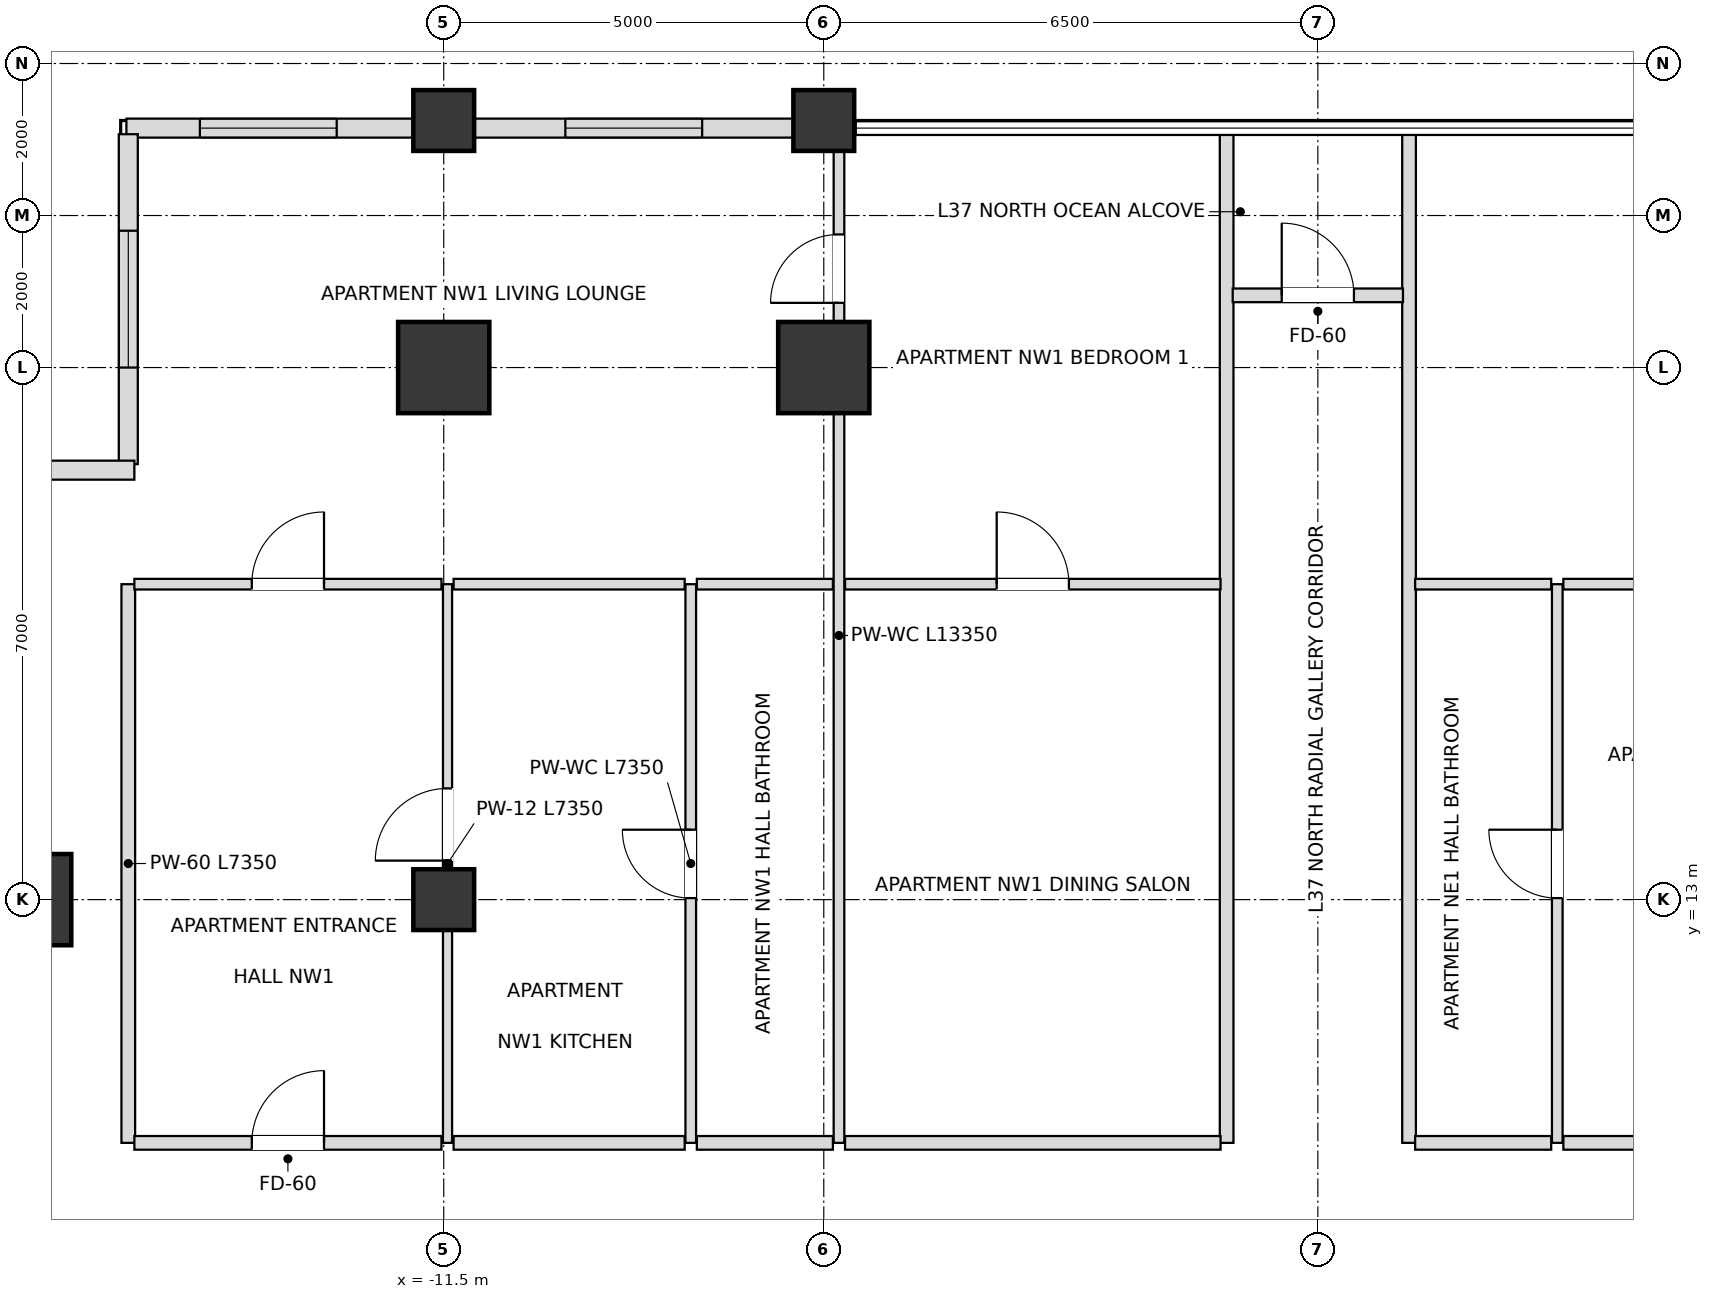
"""IFC4 building model, lengths in metres.
Left out: names, types, materials, properties, quantities, classifications, styles, units other than length and angle.
Written with IfcOpenShell. Run it as: python <this file> out.ifc"""

import sys

from ifc_helpers import new_model, si_unit, direction, frame, frame_2d, origin, origin_2d, place, context, subcontext, project, spatial, rectangle, extrude, element, fill, save


model = new_model("IFC4")
c1 = context("Model", 3, precision=1e-05, world=origin(), true_north=direction((0.0, 1.0)))
c2 = subcontext(c1, "Body", "Model", "MODEL_VIEW")
j1 = project(units=[si_unit("LENGTHUNIT", "METRE"), si_unit("PLANEANGLEUNIT", "RADIAN")], contexts=[c1])
p1 = place(None, origin())
s1 = spatial("IfcSite", under=j1, at=p1, CompositionType="ELEMENT")
p2 = place(p1, origin())
s2 = spatial("IfcBuilding", under=s1, at=p2, CompositionType="ELEMENT")
p3 = place(p2, frame((0.0, 0.0, 147.6)))
s3 = spatial("IfcBuildingStorey", under=s2, at=p3, CompositionType="ELEMENT", Elevation=147.6)
for number, where, z_axis, x_axis in (
    (1, (-6.5, 20.0, 0.0), (0.0, 0.0, 1.0), (1.0, 0.0, 0.0)),
    (2, (-11.5, 20.0, 0.0), (0.0, 0.0, 1.0), (1.0, 0.0, 0.0)),
    (3, (-17.0, 13.0, 0.0), (0.0, 0.0, 1.0), (1.0, 0.0, 0.0)),
):
    element("IfcColumn", number, at=place(p3, frame(where, z_axis=z_axis, x_axis=x_axis)), inside=s3, PredefinedType="USERDEFINED", context=c2, shape_type="SweptSolid", body=[
        extrude(rectangle(XDim=1.2, YDim=1.2, at=origin_2d()), origin(), (0.0, 0.0, 1.0), 3.6),
    ])
for number, where, z_axis, x_axis in (
    (4, (-11.5, 13.0, 0.0), (0.0, 0.0, 1.0), (1.0, 0.0, 0.0)),
    (5, (-11.5, 23.25, 0.0), (0.0, 0.0, 1.0), (1.0, 0.0, 0.0)),
    (6, (-6.5, 23.25, 0.0), (0.0, 0.0, 1.0), (1.0, 0.0, 0.0)),
):
    element("IfcColumn", number, at=place(p3, frame(where, z_axis=z_axis, x_axis=x_axis)), inside=s3, PredefinedType="COLUMN", context=c2, shape_type="SweptSolid", body=[
        extrude(rectangle(XDim=0.8, YDim=0.8, at=origin_2d()), origin(), (0.0, 0.0, 1.0), 3.6),
    ])
p4 = place(p3, frame((-6.895, 23.15, 0.0), z_axis=(0.0, 0.0, 1.0), x_axis=(-1.0, 0.0, 0.0)))
e7 = element("IfcWall", 7, at=p4, inside=s3, PredefinedType="SOLIDWALL", context=c2, shape_type="SweptSolid", body=[
    extrude(rectangle(XDim=4.21, YDim=0.25, at=frame_2d((2.105, 0.0))), origin(), (0.0, 0.0, 1.0), 2.736),
])
p5 = place(p4, frame((1.205, 0.0, 0.72)))
e8 = element("IfcOpeningElement", 8, at=p5, cuts=e7, PredefinedType="OPENING", context=c2, shape_type="SweptSolid", body=[
    extrude(rectangle(XDim=1.8, YDim=1.68, at=frame_2d((0.9, 0.84))), frame((0.0, 0.135, 0.0), z_axis=(0.0, -1.0, 0.0), x_axis=(1.0, 0.0, 0.0)), (0.0, 0.0, 1.0), 0.27),
])
p6 = place(p3, frame((-11.895, 23.15, 0.0), z_axis=(0.0, 0.0, 1.0), x_axis=(-1.0, 0.0, 0.0)))
e9 = element("IfcWall", 9, at=p6, inside=s3, PredefinedType="SOLIDWALL", context=c2, shape_type="SweptSolid", body=[
    extrude(rectangle(XDim=3.78, YDim=0.25, at=frame_2d((1.89, 0.0))), origin(), (0.0, 0.0, 1.0), 2.736),
])
p7 = place(p6, frame((1.013, 0.0, 0.72)))
e10 = element("IfcOpeningElement", 10, at=p7, cuts=e9, PredefinedType="OPENING", context=c2, shape_type="SweptSolid", body=[
    extrude(rectangle(XDim=1.8, YDim=1.68, at=frame_2d((0.9, 0.84))), frame((0.0, 0.135, 0.0), z_axis=(0.0, -1.0, 0.0), x_axis=(1.0, 0.0, 0.0)), (0.0, 0.0, 1.0), 0.27),
])
p8 = place(p3, frame((-15.65, 23.07, 0.0), z_axis=(0.0, 0.0, 1.0), x_axis=(0.0, -1.0, 0.0)))
e11 = element("IfcWall", 11, at=p8, inside=s3, PredefinedType="SOLIDWALL", context=c2, shape_type="SweptSolid", body=[
    extrude(rectangle(XDim=4.34, YDim=0.25, at=frame_2d((2.17, 0.0))), origin(), (0.0, 0.0, 1.0), 2.736),
])
p9 = place(p8, frame((1.27, 0.0, 0.72)))
e12 = element("IfcOpeningElement", 12, at=p9, cuts=e11, PredefinedType="OPENING", context=c2, shape_type="SweptSolid", body=[
    extrude(rectangle(XDim=1.8, YDim=1.68, at=frame_2d((0.9, 0.84))), frame((0.0, 0.135, 0.0), z_axis=(0.0, -1.0, 0.0), x_axis=(1.0, 0.0, 0.0)), (0.0, 0.0, 1.0), 0.27),
])
p10 = place(p3, frame((-15.57, 18.65, 0.0), z_axis=(0.0, 0.0, 1.0), x_axis=(-1.0, 0.0, 0.0)))
e13 = element("IfcWall", 13, at=p10, inside=s3, PredefinedType="SOLIDWALL", context=c2, shape_type="SweptSolid", body=[
    extrude(rectangle(XDim=4.66, YDim=0.25, at=frame_2d((2.33, 0.0))), origin(), (0.0, 0.0, 1.0), 2.736),
])
p11 = place(p10, frame((1.43, 0.0, 0.72)))
e14 = element("IfcOpeningElement", 14, at=p11, cuts=e13, PredefinedType="OPENING", context=c2, shape_type="SweptSolid", body=[
    extrude(rectangle(XDim=1.8, YDim=1.68, at=frame_2d((0.9, 0.84))), frame((0.0, 0.135, 0.0), z_axis=(0.0, -1.0, 0.0), x_axis=(1.0, 0.0, 0.0)), (0.0, 0.0, 1.0), 0.27),
])
p12 = place(p3, frame((-15.65, 9.8, 0.0), z_axis=(0.0, 0.0, 1.0), x_axis=(0.0, 1.0, 0.0)))
e15 = element("IfcWall", 15, at=p12, inside=s3, PredefinedType="PARTITIONING", context=c2, shape_type="SweptSolid", body=[
    extrude(rectangle(XDim=7.35, YDim=0.18, at=frame_2d((3.675, 0.0))), origin(), (0.0, 0.0, 1.0), 2.736),
])
p13 = place(p3, frame((-11.45, 9.8, 0.0), z_axis=(0.0, 0.0, 1.0), x_axis=(0.0, 1.0, 0.0)))
e16 = element("IfcWall", 16, at=p13, inside=s3, PredefinedType="PARTITIONING", context=c2, shape_type="SweptSolid", body=[
    extrude(rectangle(XDim=7.35, YDim=0.12, at=frame_2d((3.675, 0.0))), origin(), (0.0, 0.0, 1.0), 2.736),
])
p14 = place(p13, frame((3.713, 0.0, 0.0)))
e17 = element("IfcOpeningElement", 17, at=p14, cuts=e16, PredefinedType="OPENING", context=c2, shape_type="SweptSolid", body=[
    extrude(rectangle(XDim=0.95, YDim=2.1, at=frame_2d((0.475, 1.05))), frame((0.0, 0.07, 0.0), z_axis=(0.0, -1.0, 0.0), x_axis=(1.0, 0.0, 0.0)), (0.0, 0.0, 1.0), 0.14),
])
p15 = place(p3, frame((-8.25, 9.8, 0.0), z_axis=(0.0, 0.0, 1.0), x_axis=(0.0, 1.0, 0.0)))
e18 = element("IfcWall", 18, at=p15, inside=s3, PredefinedType="PARTITIONING", context=c2, shape_type="SweptSolid", body=[
    extrude(rectangle(XDim=7.35, YDim=0.14, at=frame_2d((3.675, 0.0))), origin(), (0.0, 0.0, 1.0), 2.816),
])
p16 = place(p15, frame((3.22, 0.0, 0.0)))
e19 = element("IfcOpeningElement", 19, at=p16, cuts=e18, PredefinedType="OPENING", context=c2, shape_type="SweptSolid", body=[
    extrude(rectangle(XDim=0.9, YDim=2.1, at=frame_2d((0.45, 1.05))), frame((0.0, 0.08, 0.0), z_axis=(0.0, -1.0, 0.0), x_axis=(1.0, 0.0, 0.0)), (0.0, 0.0, 1.0), 0.16),
])
p17 = place(p3, frame((-6.3, 9.8, 0.0), z_axis=(0.0, 0.0, 1.0), x_axis=(0.0, 1.0, 0.0)))
e20 = element("IfcWall", 20, at=p17, inside=s3, PredefinedType="PARTITIONING", context=c2, shape_type="SweptSolid", body=[
    extrude(rectangle(XDim=13.35, YDim=0.14, at=frame_2d((6.675, 0.0))), origin(), (0.0, 0.0, 1.0), 2.816),
])
p18 = place(p17, frame((11.051, 0.0, 0.0)))
e21 = element("IfcOpeningElement", 21, at=p18, cuts=e20, PredefinedType="OPENING", context=c2, shape_type="SweptSolid", body=[
    extrude(rectangle(XDim=0.9, YDim=2.1, at=frame_2d((0.45, 1.05))), frame((0.0, 0.08, 0.0), z_axis=(0.0, -1.0, 0.0), x_axis=(1.0, 0.0, 0.0)), (0.0, 0.0, 1.0), 0.16),
])
for number, where, z_axis, x_axis in (
    (22, (-1.2, 9.8, 0.0), (0.0, 0.0, 1.0), (0.0, 1.0, 0.0)),
    (23, (1.2, 9.8, 0.0), (0.0, 0.0, 1.0), (0.0, 1.0, 0.0)),
):
    element("IfcWall", number, at=place(p3, frame(where, z_axis=z_axis, x_axis=x_axis)), inside=s3, PredefinedType="PARTITIONING", context=c2, shape_type="SweptSolid", body=[
        extrude(rectangle(XDim=13.35, YDim=0.18, at=frame_2d((6.675, 0.0))), origin(), (0.0, 0.0, 1.0), 2.816),
    ])
p19 = place(p3, frame((3.15, 9.8, 0.0), z_axis=(0.0, 0.0, 1.0), x_axis=(0.0, 1.0, 0.0)))
e24 = element("IfcWall", 24, at=p19, inside=s3, PredefinedType="PARTITIONING", context=c2, shape_type="SweptSolid", body=[
    extrude(rectangle(XDim=7.35, YDim=0.14, at=frame_2d((3.675, 0.0))), origin(), (0.0, 0.0, 1.0), 3.38),
])
p20 = place(p19, frame((3.22, 0.0, 0.0)))
e25 = element("IfcOpeningElement", 25, at=p20, cuts=e24, PredefinedType="OPENING", context=c2, shape_type="SweptSolid", body=[
    extrude(rectangle(XDim=0.9, YDim=2.1, at=frame_2d((0.45, 1.05))), frame((0.0, 0.08, 0.0), z_axis=(0.0, -1.0, 0.0), x_axis=(1.0, 0.0, 0.0)), (0.0, 0.0, 1.0), 0.16),
])
p21 = place(p3, frame((-15.57, 9.8, 0.0), z_axis=(0.0, 0.0, 1.0), x_axis=(1.0, 0.0, 0.0)))
e26 = element("IfcWall", 26, at=p21, inside=s3, PredefinedType="PARTITIONING", context=c2, shape_type="SweptSolid", body=[
    extrude(rectangle(XDim=4.04, YDim=0.18, at=frame_2d((2.02, 0.0))), origin(), (0.0, 0.0, 1.0), 3.38),
])
p22 = place(p21, frame((1.545, 0.0, 0.0)))
e27 = element("IfcOpeningElement", 27, at=p22, cuts=e26, PredefinedType="OPENING", context=c2, shape_type="SweptSolid", body=[
    extrude(rectangle(XDim=0.95, YDim=2.15, at=frame_2d((0.475, 1.075))), frame((0.0, 0.1, 0.0), z_axis=(0.0, -1.0, 0.0), x_axis=(1.0, 0.0, 0.0)), (0.0, 0.0, 1.0), 0.2),
])
p23 = place(p3, frame((-11.37, 9.8, 0.0), z_axis=(0.0, 0.0, 1.0), x_axis=(1.0, 0.0, 0.0)))
e28 = element("IfcWall", 28, at=p23, inside=s3, PredefinedType="PARTITIONING", context=c2, shape_type="SweptSolid", body=[
    extrude(rectangle(XDim=3.04, YDim=0.18, at=frame_2d((1.52, 0.0))), origin(), (0.0, 0.0, 1.0), 3.38),
])
p24 = place(p3, frame((-8.17, 9.8, 0.0), z_axis=(0.0, 0.0, 1.0), x_axis=(1.0, 0.0, 0.0)))
e29 = element("IfcWall", 29, at=p24, inside=s3, PredefinedType="PARTITIONING", context=c2, shape_type="SweptSolid", body=[
    extrude(rectangle(XDim=1.79, YDim=0.18, at=frame_2d((0.895, 0.0))), origin(), (0.0, 0.0, 1.0), 2.816),
])
p25 = place(p3, frame((-6.22, 9.8, 0.0), z_axis=(0.0, 0.0, 1.0), x_axis=(1.0, 0.0, 0.0)))
e30 = element("IfcWall", 30, at=p25, inside=s3, PredefinedType="PARTITIONING", context=c2, shape_type="SweptSolid", body=[
    extrude(rectangle(XDim=4.94, YDim=0.18, at=frame_2d((2.47, 0.0))), origin(), (0.0, 0.0, 1.0), 3.38),
])
p26 = place(p3, frame((1.28, 9.8, 0.0), z_axis=(0.0, 0.0, 1.0), x_axis=(1.0, 0.0, 0.0)))
e31 = element("IfcWall", 31, at=p26, inside=s3, PredefinedType="PARTITIONING", context=c2, shape_type="SweptSolid", body=[
    extrude(rectangle(XDim=1.79, YDim=0.18, at=frame_2d((0.895, 0.0))), origin(), (0.0, 0.0, 1.0), 3.38),
])
p27 = place(p3, frame((3.23, 9.8, 0.0), z_axis=(0.0, 0.0, 1.0), x_axis=(1.0, 0.0, 0.0)))
e32 = element("IfcWall", 32, at=p27, inside=s3, PredefinedType="PARTITIONING", context=c2, shape_type="SweptSolid", body=[
    extrude(rectangle(XDim=4.04, YDim=0.18, at=frame_2d((2.02, 0.0))), origin(), (0.0, 0.0, 1.0), 2.816),
])
p28 = place(p27, frame((1.545, 0.0, 0.0)))
e33 = element("IfcOpeningElement", 33, at=p28, cuts=e32, PredefinedType="OPENING", context=c2, shape_type="SweptSolid", body=[
    extrude(rectangle(XDim=0.95, YDim=2.15, at=frame_2d((0.475, 1.075))), frame((0.0, 0.1, 0.0), z_axis=(0.0, -1.0, 0.0), x_axis=(1.0, 0.0, 0.0)), (0.0, 0.0, 1.0), 0.2),
])
p29 = place(p3, frame((-15.57, 17.15, 0.0), z_axis=(0.0, 0.0, 1.0), x_axis=(1.0, 0.0, 0.0)))
e34 = element("IfcWall", 34, at=p29, inside=s3, PredefinedType="PARTITIONING", context=c2, shape_type="SweptSolid", body=[
    extrude(rectangle(XDim=4.04, YDim=0.14, at=frame_2d((2.02, 0.0))), origin(), (0.0, 0.0, 1.0), 2.736),
])
p30 = place(p29, frame((1.545, 0.0, 0.0)))
e35 = element("IfcOpeningElement", 35, at=p30, cuts=e34, PredefinedType="OPENING", context=c2, shape_type="SweptSolid", body=[
    extrude(rectangle(XDim=0.95, YDim=2.1, at=frame_2d((0.475, 1.05))), frame((0.0, 0.08, 0.0), z_axis=(0.0, -1.0, 0.0), x_axis=(1.0, 0.0, 0.0)), (0.0, 0.0, 1.0), 0.16),
])
p31 = place(p3, frame((-11.37, 17.15, 0.0), z_axis=(0.0, 0.0, 1.0), x_axis=(1.0, 0.0, 0.0)))
e36 = element("IfcWall", 36, at=p31, inside=s3, PredefinedType="PARTITIONING", context=c2, shape_type="SweptSolid", body=[
    extrude(rectangle(XDim=3.04, YDim=0.14, at=frame_2d((1.52, 0.0))), origin(), (0.0, 0.0, 1.0), 3.38),
])
p32 = place(p3, frame((-8.17, 17.15, 0.0), z_axis=(0.0, 0.0, 1.0), x_axis=(1.0, 0.0, 0.0)))
e37 = element("IfcWall", 37, at=p32, inside=s3, PredefinedType="PARTITIONING", context=c2, shape_type="SweptSolid", body=[
    extrude(rectangle(XDim=1.79, YDim=0.14, at=frame_2d((0.895, 0.0))), origin(), (0.0, 0.0, 1.0), 2.816),
])
p33 = place(p3, frame((-6.22, 17.15, 0.0), z_axis=(0.0, 0.0, 1.0), x_axis=(1.0, 0.0, 0.0)))
e38 = element("IfcWall", 38, at=p33, inside=s3, PredefinedType="PARTITIONING", context=c2, shape_type="SweptSolid", body=[
    extrude(rectangle(XDim=4.94, YDim=0.14, at=frame_2d((2.47, 0.0))), origin(), (0.0, 0.0, 1.0), 3.38),
])
p34 = place(p33, frame((1.995, 0.0, 0.0)))
e39 = element("IfcOpeningElement", 39, at=p34, cuts=e38, PredefinedType="OPENING", context=c2, shape_type="SweptSolid", body=[
    extrude(rectangle(XDim=0.95, YDim=2.1, at=frame_2d((0.475, 1.05))), frame((0.0, 0.08, 0.0), z_axis=(0.0, -1.0, 0.0), x_axis=(1.0, 0.0, 0.0)), (0.0, 0.0, 1.0), 0.16),
])
p35 = place(p3, frame((1.28, 17.15, 0.0), z_axis=(0.0, 0.0, 1.0), x_axis=(1.0, 0.0, 0.0)))
e40 = element("IfcWall", 40, at=p35, inside=s3, PredefinedType="PARTITIONING", context=c2, shape_type="SweptSolid", body=[
    extrude(rectangle(XDim=1.79, YDim=0.14, at=frame_2d((0.895, 0.0))), origin(), (0.0, 0.0, 1.0), 3.38),
])
p36 = place(p3, frame((3.23, 17.15, 0.0), z_axis=(0.0, 0.0, 1.0), x_axis=(1.0, 0.0, 0.0)))
e41 = element("IfcWall", 41, at=p36, inside=s3, PredefinedType="PARTITIONING", context=c2, shape_type="SweptSolid", body=[
    extrude(rectangle(XDim=4.04, YDim=0.14, at=frame_2d((2.02, 0.0))), origin(), (0.0, 0.0, 1.0), 2.816),
])
p37 = place(p36, frame((1.545, 0.0, 0.0)))
e42 = element("IfcOpeningElement", 42, at=p37, cuts=e41, PredefinedType="OPENING", context=c2, shape_type="SweptSolid", body=[
    extrude(rectangle(XDim=0.95, YDim=2.1, at=frame_2d((0.475, 1.05))), frame((0.0, 0.08, 0.0), z_axis=(0.0, -1.0, 0.0), x_axis=(1.0, 0.0, 0.0)), (0.0, 0.0, 1.0), 0.16),
])
p38 = place(p3, frame((-1.12, 20.95, 0.0), z_axis=(0.0, 0.0, 1.0), x_axis=(1.0, 0.0, 0.0)))
e43 = element("IfcWall", 43, at=p38, inside=s3, PredefinedType="PARTITIONING", context=c2, shape_type="SweptSolid", body=[
    extrude(rectangle(XDim=2.24, YDim=0.18, at=frame_2d((1.12, 0.0))), origin(), (0.0, 0.0, 1.0), 3.38),
])
p39 = place(p38, frame((0.645, 0.0, 0.0)))
e44 = element("IfcOpeningElement", 44, at=p39, cuts=e43, PredefinedType="OPENING", context=c2, shape_type="SweptSolid", body=[
    extrude(rectangle(XDim=0.95, YDim=2.15, at=frame_2d((0.475, 1.075))), frame((0.0, 0.1, 0.0), z_axis=(0.0, -1.0, 0.0), x_axis=(1.0, 0.0, 0.0)), (0.0, 0.0, 1.0), 0.2),
])
p40 = place(p5, origin())
e45 = element("IfcWindow", 45, at=p40, inside=s3, PartitioningType="SINGLE_PANEL", PredefinedType="WINDOW", context=c2, shape_type="SweptSolid", body=[
    extrude(rectangle(XDim=1.8, YDim=1.68, at=frame_2d((0.9, 0.84))), frame((0.0, 0.03, 0.0), z_axis=(0.0, -1.0, 0.0), x_axis=(1.0, 0.0, 0.0)), (0.0, 0.0, 1.0), 0.06),
])
fill(e8, e45)
p41 = place(p7, origin())
e46 = element("IfcWindow", 46, at=p41, inside=s3, PartitioningType="SINGLE_PANEL", PredefinedType="WINDOW", context=c2, shape_type="SweptSolid", body=[
    extrude(rectangle(XDim=1.8, YDim=1.68, at=frame_2d((0.9, 0.84))), frame((0.0, 0.03, 0.0), z_axis=(0.0, -1.0, 0.0), x_axis=(1.0, 0.0, 0.0)), (0.0, 0.0, 1.0), 0.06),
])
fill(e10, e46)
p42 = place(p9, origin())
e47 = element("IfcWindow", 47, at=p42, inside=s3, PartitioningType="SINGLE_PANEL", PredefinedType="WINDOW", context=c2, shape_type="SweptSolid", body=[
    extrude(rectangle(XDim=1.8, YDim=1.68, at=frame_2d((0.9, 0.84))), frame((0.0, 0.03, 0.0), z_axis=(0.0, -1.0, 0.0), x_axis=(1.0, 0.0, 0.0)), (0.0, 0.0, 1.0), 0.06),
])
fill(e12, e47)
p43 = place(p39, origin())
e48 = element("IfcDoor", 48, at=p43, inside=s3, OperationType="SINGLE_SWING_LEFT", PredefinedType="DOOR", context=c2, shape_type="SweptSolid", body=[
    extrude(rectangle(XDim=0.95, YDim=2.15, at=frame_2d((0.475, 1.075))), frame((0.0, 0.025, 0.0), z_axis=(0.0, -1.0, 0.0), x_axis=(1.0, 0.0, 0.0)), (0.0, 0.0, 1.0), 0.05),
])
fill(e44, e48)
p44 = place(p22, origin())
e49 = element("IfcDoor", 49, at=p44, inside=s3, OperationType="SINGLE_SWING_RIGHT", PredefinedType="DOOR", context=c2, shape_type="SweptSolid", body=[
    extrude(rectangle(XDim=0.95, YDim=2.15, at=frame_2d((0.475, 1.075))), frame((0.0, 0.025, 0.0), z_axis=(0.0, -1.0, 0.0), x_axis=(1.0, 0.0, 0.0)), (0.0, 0.0, 1.0), 0.05),
])
fill(e27, e49)
p45 = place(p14, origin())
e50 = element("IfcDoor", 50, at=p45, inside=s3, OperationType="SINGLE_SWING_LEFT", PredefinedType="DOOR", context=c2, shape_type="SweptSolid", body=[
    extrude(rectangle(XDim=0.95, YDim=2.1, at=frame_2d((0.475, 1.05))), frame((0.0, 0.025, 0.0), z_axis=(0.0, -1.0, 0.0), x_axis=(1.0, 0.0, 0.0)), (0.0, 0.0, 1.0), 0.05),
])
fill(e17, e50)
p46 = place(p16, origin())
e51 = element("IfcDoor", 51, at=p46, inside=s3, OperationType="SINGLE_SWING_RIGHT", PredefinedType="DOOR", context=c2, shape_type="SweptSolid", body=[
    extrude(rectangle(XDim=0.9, YDim=2.1, at=frame_2d((0.45, 1.05))), frame((0.0, 0.025, 0.0), z_axis=(0.0, -1.0, 0.0), x_axis=(1.0, 0.0, 0.0)), (0.0, 0.0, 1.0), 0.05),
])
fill(e19, e51)
p47 = place(p34, origin())
e52 = element("IfcDoor", 52, at=p47, inside=s3, OperationType="SINGLE_SWING_LEFT", PredefinedType="DOOR", context=c2, shape_type="SweptSolid", body=[
    extrude(rectangle(XDim=0.95, YDim=2.1, at=frame_2d((0.475, 1.05))), frame((0.0, 0.025, 0.0), z_axis=(0.0, -1.0, 0.0), x_axis=(1.0, 0.0, 0.0)), (0.0, 0.0, 1.0), 0.05),
])
fill(e39, e52)
p48 = place(p30, origin())
e53 = element("IfcDoor", 53, at=p48, inside=s3, OperationType="SINGLE_SWING_RIGHT", PredefinedType="DOOR", context=c2, shape_type="SweptSolid", body=[
    extrude(rectangle(XDim=0.95, YDim=2.1, at=frame_2d((0.475, 1.05))), frame((0.0, 0.025, 0.0), z_axis=(0.0, -1.0, 0.0), x_axis=(1.0, 0.0, 0.0)), (0.0, 0.0, 1.0), 0.05),
])
fill(e35, e53)
p49 = place(p18, origin())
e54 = element("IfcDoor", 54, at=p49, inside=s3, OperationType="SINGLE_SWING_LEFT", PredefinedType="DOOR", context=c2, shape_type="SweptSolid", body=[
    extrude(rectangle(XDim=0.9, YDim=2.1, at=frame_2d((0.45, 1.05))), frame((0.0, 0.025, 0.0), z_axis=(0.0, -1.0, 0.0), x_axis=(1.0, 0.0, 0.0)), (0.0, 0.0, 1.0), 0.05),
])
fill(e21, e54)
p50 = place(p20, origin())
e55 = element("IfcDoor", 55, at=p50, inside=s3, OperationType="SINGLE_SWING_RIGHT", PredefinedType="DOOR", context=c2, shape_type="SweptSolid", body=[
    extrude(rectangle(XDim=0.9, YDim=2.1, at=frame_2d((0.45, 1.05))), frame((0.0, 0.025, 0.0), z_axis=(0.0, -1.0, 0.0), x_axis=(1.0, 0.0, 0.0)), (0.0, 0.0, 1.0), 0.05),
])
fill(e25, e55)
save(model, sys.argv[1])
